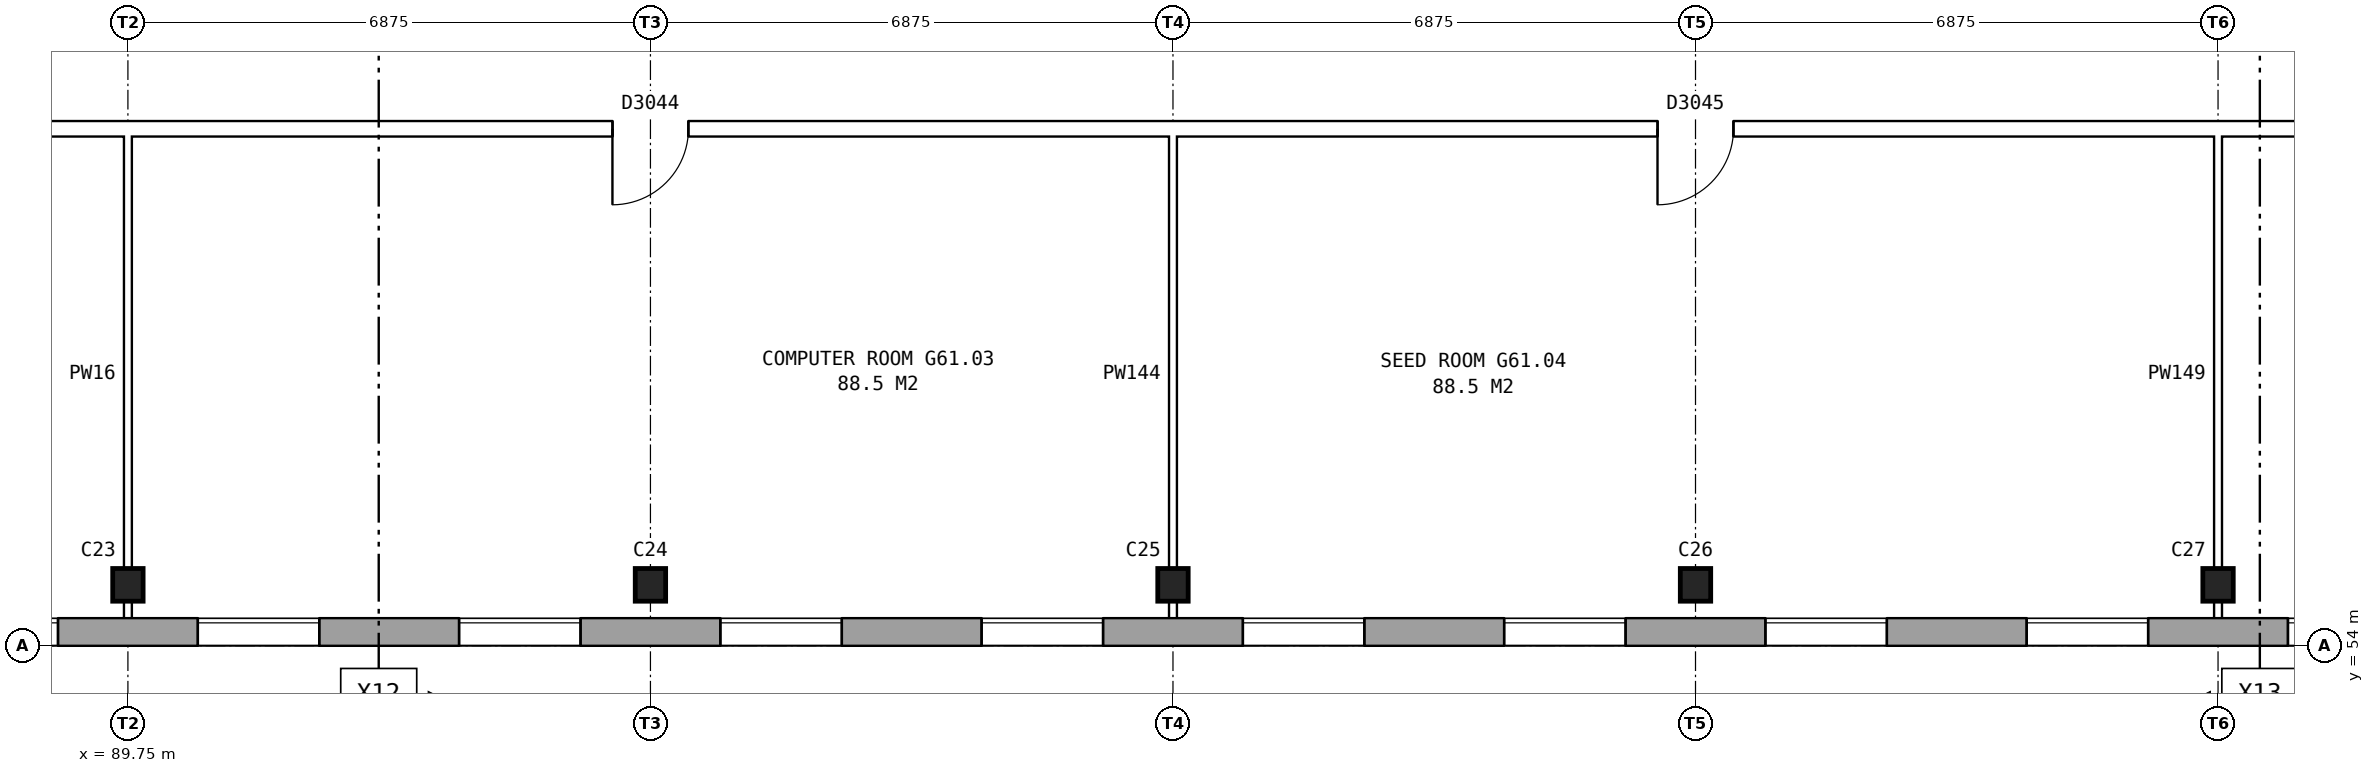
"""IFC4 building model, lengths in metres.
Left out: names, types, materials, properties, quantities, classifications, styles, units other than length and angle.
Written with IfcOpenShell. Run it as: python <this file> out.ifc"""

import sys

from ifc_helpers import new_model, si_unit, direction, frame, frame_2d, origin, origin_2d, place, context, subcontext, project, spatial, rectangle, i_section, extrude, element, fill, save


model = new_model("IFC4")
c1 = context("Model", 3, precision=1e-05, world=origin(), true_north=direction((0.0, 1.0)))
c2 = subcontext(c1, "Body", "Model", "MODEL_VIEW")
j1 = project(units=[si_unit("LENGTHUNIT", "METRE"), si_unit("PLANEANGLEUNIT", "RADIAN")], contexts=[c1])
p1 = place(None, origin())
s1 = spatial("IfcSite", under=j1, at=p1, CompositionType="ELEMENT")
p2 = place(p1, origin())
s2 = spatial("IfcBuilding", under=s1, at=p2, CompositionType="ELEMENT")
p3 = place(p2, frame((0.0, 0.0, 215.2)))
s3 = spatial("IfcBuildingStorey", under=s2, at=p3, CompositionType="ELEMENT", Elevation=215.2)
for number, where, z_axis, x_axis in (
    (1, (89.75, 54.8, 0.0), (0.0, 0.0, 1.0), (1.0, 0.0, 0.0)),
    (2, (96.625, 54.8, 0.0), (0.0, 0.0, 1.0), (1.0, 0.0, 0.0)),
    (3, (103.5, 54.8, 0.0), (0.0, 0.0, 1.0), (1.0, 0.0, 0.0)),
    (4, (110.375, 54.8, 0.0), (0.0, 0.0, 1.0), (1.0, 0.0, 0.0)),
    (5, (117.25, 54.8, 0.0), (0.0, 0.0, 1.0), (1.0, 0.0, 0.0)),
):
    element("IfcColumn", number, at=place(p3, frame(where, z_axis=z_axis, x_axis=x_axis)), inside=s3, PredefinedType="COLUMN", context=c2, shape_type="SweptSolid", body=[
        extrude(i_section(OverallWidth=0.4, OverallDepth=0.43, WebThickness=0.04, FlangeThickness=0.04, at=origin_2d()), origin(), (0.0, 0.0, 1.0), 5.6),
    ])
p4 = place(p3, frame((75.95, 54.18, 0.0), z_axis=(0.0, 0.0, 1.0), x_axis=(1.0, 0.0, 0.0)))
e6 = element("IfcWall", 6, at=p4, inside=s3, PredefinedType="STANDARD", context=c2, shape_type="SweptSolid", body=[
    extrude(rectangle(XDim=55.1, YDim=0.36, at=frame_2d((27.55, 0.0))), origin(), (0.0, 0.0, 1.0), 5.6),
])
p5 = place(p4, frame((0.969, 0.0, 0.15)))
e7 = element("IfcOpeningElement", 7, at=p5, cuts=e6, PredefinedType="OPENING", context=c2, shape_type="SweptSolid", body=[
    extrude(rectangle(XDim=1.6, YDim=2.4, at=frame_2d((0.8, 1.2))), frame((0.0, 0.19, 0.0), z_axis=(0.0, -1.0, 0.0), x_axis=(1.0, 0.0, 0.0)), (0.0, 0.0, 1.0), 0.38),
])
p6 = place(p4, frame((4.406, 0.0, 0.15)))
e8 = element("IfcOpeningElement", 8, at=p6, cuts=e6, PredefinedType="OPENING", context=c2, shape_type="SweptSolid", body=[
    extrude(rectangle(XDim=1.6, YDim=2.4, at=frame_2d((0.8, 1.2))), frame((0.0, 0.19, 0.0), z_axis=(0.0, -1.0, 0.0), x_axis=(1.0, 0.0, 0.0)), (0.0, 0.0, 1.0), 0.38),
])
p7 = place(p4, frame((7.844, 0.0, 0.15)))
e9 = element("IfcOpeningElement", 9, at=p7, cuts=e6, PredefinedType="OPENING", context=c2, shape_type="SweptSolid", body=[
    extrude(rectangle(XDim=1.6, YDim=2.4, at=frame_2d((0.8, 1.2))), frame((0.0, 0.19, 0.0), z_axis=(0.0, -1.0, 0.0), x_axis=(1.0, 0.0, 0.0)), (0.0, 0.0, 1.0), 0.38),
])
p8 = place(p4, frame((11.281, 0.0, 0.15)))
e10 = element("IfcOpeningElement", 10, at=p8, cuts=e6, PredefinedType="OPENING", context=c2, shape_type="SweptSolid", body=[
    extrude(rectangle(XDim=1.6, YDim=2.4, at=frame_2d((0.8, 1.2))), frame((0.0, 0.19, 0.0), z_axis=(0.0, -1.0, 0.0), x_axis=(1.0, 0.0, 0.0)), (0.0, 0.0, 1.0), 0.38),
])
p9 = place(p4, frame((14.719, 0.0, 0.15)))
e11 = element("IfcOpeningElement", 11, at=p9, cuts=e6, PredefinedType="OPENING", context=c2, shape_type="SweptSolid", body=[
    extrude(rectangle(XDim=1.6, YDim=2.4, at=frame_2d((0.8, 1.2))), frame((0.0, 0.19, 0.0), z_axis=(0.0, -1.0, 0.0), x_axis=(1.0, 0.0, 0.0)), (0.0, 0.0, 1.0), 0.38),
])
p10 = place(p4, frame((18.156, 0.0, 0.15)))
e12 = element("IfcOpeningElement", 12, at=p10, cuts=e6, PredefinedType="OPENING", context=c2, shape_type="SweptSolid", body=[
    extrude(rectangle(XDim=1.6, YDim=2.4, at=frame_2d((0.8, 1.2))), frame((0.0, 0.19, 0.0), z_axis=(0.0, -1.0, 0.0), x_axis=(1.0, 0.0, 0.0)), (0.0, 0.0, 1.0), 0.38),
])
p11 = place(p4, frame((21.594, 0.0, 0.15)))
e13 = element("IfcOpeningElement", 13, at=p11, cuts=e6, PredefinedType="OPENING", context=c2, shape_type="SweptSolid", body=[
    extrude(rectangle(XDim=1.6, YDim=2.4, at=frame_2d((0.8, 1.2))), frame((0.0, 0.19, 0.0), z_axis=(0.0, -1.0, 0.0), x_axis=(1.0, 0.0, 0.0)), (0.0, 0.0, 1.0), 0.38),
])
p12 = place(p4, frame((25.031, 0.0, 0.15)))
e14 = element("IfcOpeningElement", 14, at=p12, cuts=e6, PredefinedType="OPENING", context=c2, shape_type="SweptSolid", body=[
    extrude(rectangle(XDim=1.6, YDim=2.4, at=frame_2d((0.8, 1.2))), frame((0.0, 0.19, 0.0), z_axis=(0.0, -1.0, 0.0), x_axis=(1.0, 0.0, 0.0)), (0.0, 0.0, 1.0), 0.38),
])
p13 = place(p4, frame((28.469, 0.0, 0.15)))
e15 = element("IfcOpeningElement", 15, at=p13, cuts=e6, PredefinedType="OPENING", context=c2, shape_type="SweptSolid", body=[
    extrude(rectangle(XDim=1.6, YDim=2.4, at=frame_2d((0.8, 1.2))), frame((0.0, 0.19, 0.0), z_axis=(0.0, -1.0, 0.0), x_axis=(1.0, 0.0, 0.0)), (0.0, 0.0, 1.0), 0.38),
])
p14 = place(p4, frame((31.906, 0.0, 0.15)))
e16 = element("IfcOpeningElement", 16, at=p14, cuts=e6, PredefinedType="OPENING", context=c2, shape_type="SweptSolid", body=[
    extrude(rectangle(XDim=1.6, YDim=2.4, at=frame_2d((0.8, 1.2))), frame((0.0, 0.19, 0.0), z_axis=(0.0, -1.0, 0.0), x_axis=(1.0, 0.0, 0.0)), (0.0, 0.0, 1.0), 0.38),
])
p15 = place(p4, frame((35.344, 0.0, 0.15)))
e17 = element("IfcOpeningElement", 17, at=p15, cuts=e6, PredefinedType="OPENING", context=c2, shape_type="SweptSolid", body=[
    extrude(rectangle(XDim=1.6, YDim=2.4, at=frame_2d((0.8, 1.2))), frame((0.0, 0.19, 0.0), z_axis=(0.0, -1.0, 0.0), x_axis=(1.0, 0.0, 0.0)), (0.0, 0.0, 1.0), 0.38),
])
p16 = place(p4, frame((38.781, 0.0, 0.15)))
e18 = element("IfcOpeningElement", 18, at=p16, cuts=e6, PredefinedType="OPENING", context=c2, shape_type="SweptSolid", body=[
    extrude(rectangle(XDim=1.6, YDim=2.4, at=frame_2d((0.8, 1.2))), frame((0.0, 0.19, 0.0), z_axis=(0.0, -1.0, 0.0), x_axis=(1.0, 0.0, 0.0)), (0.0, 0.0, 1.0), 0.38),
])
p17 = place(p4, frame((42.219, 0.0, 0.15)))
e19 = element("IfcOpeningElement", 19, at=p17, cuts=e6, PredefinedType="OPENING", context=c2, shape_type="SweptSolid", body=[
    extrude(rectangle(XDim=1.6, YDim=2.4, at=frame_2d((0.8, 1.2))), frame((0.0, 0.19, 0.0), z_axis=(0.0, -1.0, 0.0), x_axis=(1.0, 0.0, 0.0)), (0.0, 0.0, 1.0), 0.38),
])
p18 = place(p4, frame((45.656, 0.0, 0.15)))
e20 = element("IfcOpeningElement", 20, at=p18, cuts=e6, PredefinedType="OPENING", context=c2, shape_type="SweptSolid", body=[
    extrude(rectangle(XDim=1.6, YDim=2.4, at=frame_2d((0.8, 1.2))), frame((0.0, 0.19, 0.0), z_axis=(0.0, -1.0, 0.0), x_axis=(1.0, 0.0, 0.0)), (0.0, 0.0, 1.0), 0.38),
])
p19 = place(p4, frame((49.094, 0.0, 0.15)))
e21 = element("IfcOpeningElement", 21, at=p19, cuts=e6, PredefinedType="OPENING", context=c2, shape_type="SweptSolid", body=[
    extrude(rectangle(XDim=1.6, YDim=2.4, at=frame_2d((0.8, 1.2))), frame((0.0, 0.19, 0.0), z_axis=(0.0, -1.0, 0.0), x_axis=(1.0, 0.0, 0.0)), (0.0, 0.0, 1.0), 0.38),
])
p20 = place(p4, frame((52.531, 0.0, 0.15)))
e22 = element("IfcOpeningElement", 22, at=p20, cuts=e6, PredefinedType="OPENING", context=c2, shape_type="SweptSolid", body=[
    extrude(rectangle(XDim=1.6, YDim=2.4, at=frame_2d((0.8, 1.2))), frame((0.0, 0.19, 0.0), z_axis=(0.0, -1.0, 0.0), x_axis=(1.0, 0.0, 0.0)), (0.0, 0.0, 1.0), 0.38),
])
p21 = place(p3, frame((32.24, 60.8, 0.0), z_axis=(0.0, 0.0, 1.0), x_axis=(1.0, 0.0, 0.0)))
e23 = element("IfcWall", 23, at=p21, inside=s3, PredefinedType="PARTITIONING", context=c2, shape_type="SweptSolid", body=[
    extrude(rectangle(XDim=136.52, YDim=0.2, at=frame_2d((68.26, 0.0))), origin(), (0.0, 0.0, 1.0), 5.6),
])
p22 = place(p21, frame((3.44, 0.0, 0.0)))
e24 = element("IfcOpeningElement", 24, at=p22, cuts=e23, PredefinedType="OPENING", context=c2, shape_type="SweptSolid", body=[
    extrude(rectangle(XDim=1.0, YDim=2.1, at=frame_2d((0.5, 1.05))), frame((0.0, 0.11, 0.0), z_axis=(0.0, -1.0, 0.0), x_axis=(1.0, 0.0, 0.0)), (0.0, 0.0, 1.0), 0.22),
])
p23 = place(p21, frame((11.76, 0.0, 0.0)))
e25 = element("IfcOpeningElement", 25, at=p23, cuts=e23, PredefinedType="OPENING", context=c2, shape_type="SweptSolid", body=[
    extrude(rectangle(XDim=1.0, YDim=2.1, at=frame_2d((0.5, 1.05))), frame((0.0, 0.11, 0.0), z_axis=(0.0, -1.0, 0.0), x_axis=(1.0, 0.0, 0.0)), (0.0, 0.0, 1.0), 0.22),
])
p24 = place(p21, frame((20.76, 0.0, 0.0)))
e26 = element("IfcOpeningElement", 26, at=p24, cuts=e23, PredefinedType="OPENING", context=c2, shape_type="SweptSolid", body=[
    extrude(rectangle(XDim=1.0, YDim=2.1, at=frame_2d((0.5, 1.05))), frame((0.0, 0.11, 0.0), z_axis=(0.0, -1.0, 0.0), x_axis=(1.0, 0.0, 0.0)), (0.0, 0.0, 1.0), 0.22),
])
p25 = place(p21, frame((29.76, 0.0, 0.0)))
e27 = element("IfcOpeningElement", 27, at=p25, cuts=e23, PredefinedType="OPENING", context=c2, shape_type="SweptSolid", body=[
    extrude(rectangle(XDim=1.0, YDim=2.1, at=frame_2d((0.5, 1.05))), frame((0.0, 0.11, 0.0), z_axis=(0.0, -1.0, 0.0), x_axis=(1.0, 0.0, 0.0)), (0.0, 0.0, 1.0), 0.22),
])
p26 = place(p21, frame((38.58, 0.0, 0.0)))
e28 = element("IfcOpeningElement", 28, at=p26, cuts=e23, PredefinedType="OPENING", context=c2, shape_type="SweptSolid", body=[
    extrude(rectangle(XDim=1.0, YDim=2.1, at=frame_2d((0.5, 1.05))), frame((0.0, 0.11, 0.0), z_axis=(0.0, -1.0, 0.0), x_axis=(1.0, 0.0, 0.0)), (0.0, 0.0, 1.0), 0.22),
])
p27 = place(p21, frame((49.955, 0.0, 0.0)))
e29 = element("IfcOpeningElement", 29, at=p27, cuts=e23, PredefinedType="OPENING", context=c2, shape_type="SweptSolid", body=[
    extrude(rectangle(XDim=1.0, YDim=2.1, at=frame_2d((0.5, 1.05))), frame((0.0, 0.11, 0.0), z_axis=(0.0, -1.0, 0.0), x_axis=(1.0, 0.0, 0.0)), (0.0, 0.0, 1.0), 0.22),
])
p28 = place(p21, frame((63.885, 0.0, 0.0)))
e30 = element("IfcOpeningElement", 30, at=p28, cuts=e23, PredefinedType="OPENING", context=c2, shape_type="SweptSolid", body=[
    extrude(rectangle(XDim=1.0, YDim=2.1, at=frame_2d((0.5, 1.05))), frame((0.0, 0.11, 0.0), z_axis=(0.0, -1.0, 0.0), x_axis=(1.0, 0.0, 0.0)), (0.0, 0.0, 1.0), 0.22),
])
p29 = place(p21, frame((77.635, 0.0, 0.0)))
e31 = element("IfcOpeningElement", 31, at=p29, cuts=e23, PredefinedType="OPENING", context=c2, shape_type="SweptSolid", body=[
    extrude(rectangle(XDim=1.0, YDim=2.1, at=frame_2d((0.5, 1.05))), frame((0.0, 0.11, 0.0), z_axis=(0.0, -1.0, 0.0), x_axis=(1.0, 0.0, 0.0)), (0.0, 0.0, 1.0), 0.22),
])
p30 = place(p21, frame((91.565, 0.0, 0.0)))
e32 = element("IfcOpeningElement", 32, at=p30, cuts=e23, PredefinedType="OPENING", context=c2, shape_type="SweptSolid", body=[
    extrude(rectangle(XDim=1.0, YDim=2.1, at=frame_2d((0.5, 1.05))), frame((0.0, 0.11, 0.0), z_axis=(0.0, -1.0, 0.0), x_axis=(1.0, 0.0, 0.0)), (0.0, 0.0, 1.0), 0.22),
])
p31 = place(p21, frame((101.44, 0.0, 0.0)))
e33 = element("IfcOpeningElement", 33, at=p31, cuts=e23, PredefinedType="OPENING", context=c2, shape_type="SweptSolid", body=[
    extrude(rectangle(XDim=1.0, YDim=2.1, at=frame_2d((0.5, 1.05))), frame((0.0, 0.11, 0.0), z_axis=(0.0, -1.0, 0.0), x_axis=(1.0, 0.0, 0.0)), (0.0, 0.0, 1.0), 0.22),
])
p32 = place(p21, frame((108.76, 0.0, 0.0)))
e34 = element("IfcOpeningElement", 34, at=p32, cuts=e23, PredefinedType="OPENING", context=c2, shape_type="SweptSolid", body=[
    extrude(rectangle(XDim=1.0, YDim=2.1, at=frame_2d((0.5, 1.05))), frame((0.0, 0.11, 0.0), z_axis=(0.0, -1.0, 0.0), x_axis=(1.0, 0.0, 0.0)), (0.0, 0.0, 1.0), 0.22),
])
p33 = place(p21, frame((117.76, 0.0, 0.0)))
e35 = element("IfcOpeningElement", 35, at=p33, cuts=e23, PredefinedType="OPENING", context=c2, shape_type="SweptSolid", body=[
    extrude(rectangle(XDim=1.0, YDim=2.1, at=frame_2d((0.5, 1.05))), frame((0.0, 0.11, 0.0), z_axis=(0.0, -1.0, 0.0), x_axis=(1.0, 0.0, 0.0)), (0.0, 0.0, 1.0), 0.22),
])
p34 = place(p21, frame((125.26, 0.0, 0.0)))
e36 = element("IfcOpeningElement", 36, at=p34, cuts=e23, PredefinedType="OPENING", context=c2, shape_type="SweptSolid", body=[
    extrude(rectangle(XDim=1.0, YDim=2.1, at=frame_2d((0.5, 1.05))), frame((0.0, 0.11, 0.0), z_axis=(0.0, -1.0, 0.0), x_axis=(1.0, 0.0, 0.0)), (0.0, 0.0, 1.0), 0.22),
])
p35 = place(p21, frame((132.08, 0.0, 0.0)))
e37 = element("IfcOpeningElement", 37, at=p35, cuts=e23, PredefinedType="OPENING", context=c2, shape_type="SweptSolid", body=[
    extrude(rectangle(XDim=1.0, YDim=2.1, at=frame_2d((0.5, 1.05))), frame((0.0, 0.11, 0.0), z_axis=(0.0, -1.0, 0.0), x_axis=(1.0, 0.0, 0.0)), (0.0, 0.0, 1.0), 0.22),
])
for number, where, z_axis, x_axis in (
    (38, (89.75, 54.24, 0.0), (0.0, 0.0, 1.0), (0.0, 1.0, 0.0)),
    (39, (103.5, 54.24, 0.0), (0.0, 0.0, 1.0), (0.0, 1.0, 0.0)),
    (40, (117.25, 54.24, 0.0), (0.0, 0.0, 1.0), (0.0, 1.0, 0.0)),
):
    element("IfcWall", number, at=place(p3, frame(where, z_axis=z_axis, x_axis=x_axis)), inside=s3, PredefinedType="PARTITIONING", context=c2, shape_type="SweptSolid", body=[
        extrude(rectangle(XDim=6.66, YDim=0.1, at=frame_2d((3.33, 0.0))), origin(), (0.0, 0.0, 1.0), 5.067),
    ])
p36 = place(p8, origin())
e41 = element("IfcWindow", 41, at=p36, inside=s3, PartitioningType="SINGLE_PANEL", PredefinedType="WINDOW", context=c2, shape_type="SweptSolid", body=[
    extrude(rectangle(XDim=1.6, YDim=2.4, at=frame_2d((0.8, 1.2))), frame((0.0, 0.15, 0.0), z_axis=(0.0, -1.0, 0.0), x_axis=(1.0, 0.0, 0.0)), (0.0, 0.0, 1.0), 0.06),
])
fill(e10, e41)
p37 = place(p9, origin())
e42 = element("IfcWindow", 42, at=p37, inside=s3, PartitioningType="SINGLE_PANEL", PredefinedType="WINDOW", context=c2, shape_type="SweptSolid", body=[
    extrude(rectangle(XDim=1.6, YDim=2.4, at=frame_2d((0.8, 1.2))), frame((0.0, 0.15, 0.0), z_axis=(0.0, -1.0, 0.0), x_axis=(1.0, 0.0, 0.0)), (0.0, 0.0, 1.0), 0.06),
])
fill(e11, e42)
p38 = place(p10, origin())
e43 = element("IfcWindow", 43, at=p38, inside=s3, PartitioningType="SINGLE_PANEL", PredefinedType="WINDOW", context=c2, shape_type="SweptSolid", body=[
    extrude(rectangle(XDim=1.6, YDim=2.4, at=frame_2d((0.8, 1.2))), frame((0.0, 0.15, 0.0), z_axis=(0.0, -1.0, 0.0), x_axis=(1.0, 0.0, 0.0)), (0.0, 0.0, 1.0), 0.06),
])
fill(e12, e43)
p39 = place(p11, origin())
e44 = element("IfcWindow", 44, at=p39, inside=s3, PartitioningType="SINGLE_PANEL", PredefinedType="WINDOW", context=c2, shape_type="SweptSolid", body=[
    extrude(rectangle(XDim=1.6, YDim=2.4, at=frame_2d((0.8, 1.2))), frame((0.0, 0.15, 0.0), z_axis=(0.0, -1.0, 0.0), x_axis=(1.0, 0.0, 0.0)), (0.0, 0.0, 1.0), 0.06),
])
fill(e13, e44)
p40 = place(p12, origin())
e45 = element("IfcWindow", 45, at=p40, inside=s3, PartitioningType="SINGLE_PANEL", PredefinedType="WINDOW", context=c2, shape_type="SweptSolid", body=[
    extrude(rectangle(XDim=1.6, YDim=2.4, at=frame_2d((0.8, 1.2))), frame((0.0, 0.15, 0.0), z_axis=(0.0, -1.0, 0.0), x_axis=(1.0, 0.0, 0.0)), (0.0, 0.0, 1.0), 0.06),
])
fill(e14, e45)
p41 = place(p13, origin())
e46 = element("IfcWindow", 46, at=p41, inside=s3, PartitioningType="SINGLE_PANEL", PredefinedType="WINDOW", context=c2, shape_type="SweptSolid", body=[
    extrude(rectangle(XDim=1.6, YDim=2.4, at=frame_2d((0.8, 1.2))), frame((0.0, 0.15, 0.0), z_axis=(0.0, -1.0, 0.0), x_axis=(1.0, 0.0, 0.0)), (0.0, 0.0, 1.0), 0.06),
])
fill(e15, e46)
p42 = place(p14, origin())
e47 = element("IfcWindow", 47, at=p42, inside=s3, PartitioningType="SINGLE_PANEL", PredefinedType="WINDOW", context=c2, shape_type="SweptSolid", body=[
    extrude(rectangle(XDim=1.6, YDim=2.4, at=frame_2d((0.8, 1.2))), frame((0.0, 0.15, 0.0), z_axis=(0.0, -1.0, 0.0), x_axis=(1.0, 0.0, 0.0)), (0.0, 0.0, 1.0), 0.06),
])
fill(e16, e47)
p43 = place(p15, origin())
e48 = element("IfcWindow", 48, at=p43, inside=s3, PartitioningType="SINGLE_PANEL", PredefinedType="WINDOW", context=c2, shape_type="SweptSolid", body=[
    extrude(rectangle(XDim=1.6, YDim=2.4, at=frame_2d((0.8, 1.2))), frame((0.0, 0.15, 0.0), z_axis=(0.0, -1.0, 0.0), x_axis=(1.0, 0.0, 0.0)), (0.0, 0.0, 1.0), 0.06),
])
fill(e17, e48)
p44 = place(p16, origin())
e49 = element("IfcWindow", 49, at=p44, inside=s3, PartitioningType="SINGLE_PANEL", PredefinedType="WINDOW", context=c2, shape_type="SweptSolid", body=[
    extrude(rectangle(XDim=1.6, YDim=2.4, at=frame_2d((0.8, 1.2))), frame((0.0, 0.15, 0.0), z_axis=(0.0, -1.0, 0.0), x_axis=(1.0, 0.0, 0.0)), (0.0, 0.0, 1.0), 0.06),
])
fill(e18, e49)
p45 = place(p17, origin())
e50 = element("IfcWindow", 50, at=p45, inside=s3, PartitioningType="SINGLE_PANEL", PredefinedType="WINDOW", context=c2, shape_type="SweptSolid", body=[
    extrude(rectangle(XDim=1.6, YDim=2.4, at=frame_2d((0.8, 1.2))), frame((0.0, 0.15, 0.0), z_axis=(0.0, -1.0, 0.0), x_axis=(1.0, 0.0, 0.0)), (0.0, 0.0, 1.0), 0.06),
])
fill(e19, e50)
p46 = place(p28, frame((1.0, 0.0, 0.0), z_axis=(0.0, 0.0, 1.0), x_axis=(-1.0, 0.0, 0.0)))
e51 = element("IfcDoor", 51, at=p46, inside=s3, OperationType="SINGLE_SWING_RIGHT", PredefinedType="DOOR", context=c2, shape_type="SweptSolid", body=[
    extrude(rectangle(XDim=1.0, YDim=2.1, at=frame_2d((0.5, 1.05))), frame((0.0, 0.025, 0.0), z_axis=(0.0, -1.0, 0.0), x_axis=(1.0, 0.0, 0.0)), (0.0, 0.0, 1.0), 0.05),
])
fill(e30, e51)
p47 = place(p29, frame((1.0, 0.0, 0.0), z_axis=(0.0, 0.0, 1.0), x_axis=(-1.0, 0.0, 0.0)))
e52 = element("IfcDoor", 52, at=p47, inside=s3, OperationType="SINGLE_SWING_RIGHT", PredefinedType="DOOR", context=c2, shape_type="SweptSolid", body=[
    extrude(rectangle(XDim=1.0, YDim=2.1, at=frame_2d((0.5, 1.05))), frame((0.0, 0.025, 0.0), z_axis=(0.0, -1.0, 0.0), x_axis=(1.0, 0.0, 0.0)), (0.0, 0.0, 1.0), 0.05),
])
fill(e31, e52)
save(model, sys.argv[1])
